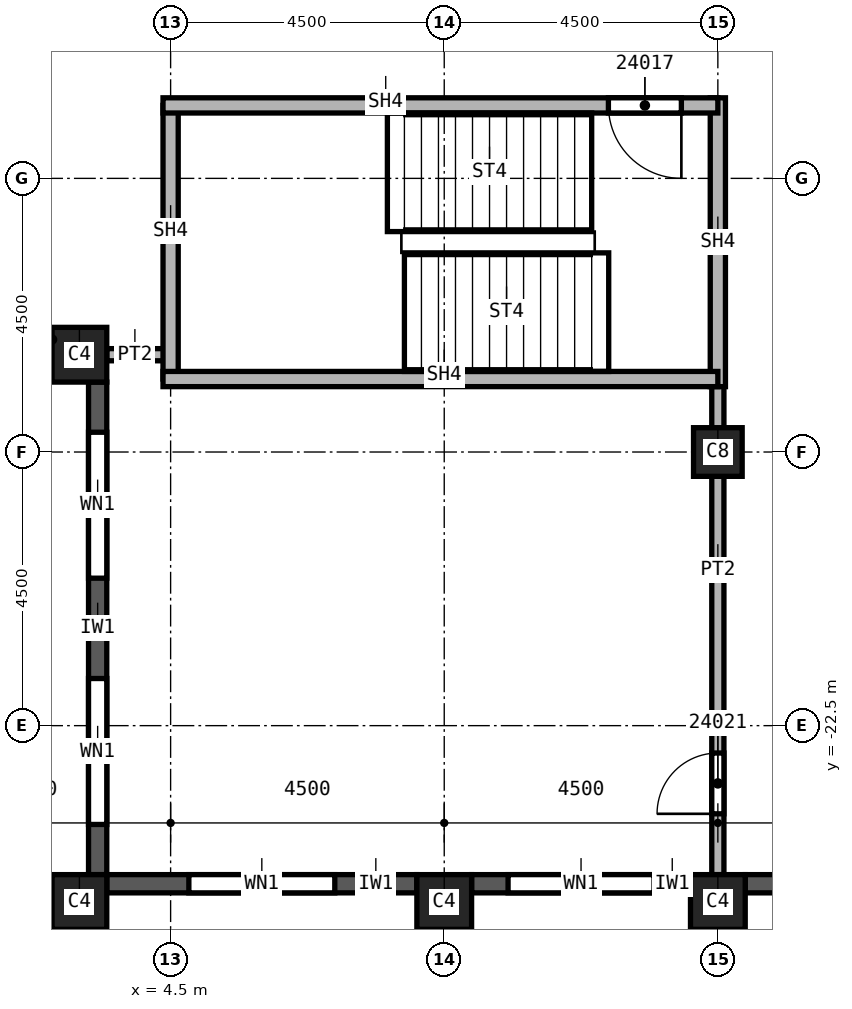
"""IFC4 building model, lengths in metres.
Left out: names, types, materials, properties, quantities, classifications, styles, units other than length and angle.
Written with IfcOpenShell. Run it as: python <this file> out.ifc"""

import sys

from ifc_helpers import new_model, si_unit, direction, frame, frame_2d, origin, origin_2d, place, context, subcontext, project, spatial, rectangle, extrude, element, fill, save


model = new_model("IFC4")
c1 = context("Model", 3, precision=1e-05, world=origin(), true_north=direction((0.0, 1.0)))
c2 = subcontext(c1, "Body", "Model", "MODEL_VIEW")
j1 = project(units=[si_unit("LENGTHUNIT", "METRE"), si_unit("PLANEANGLEUNIT", "RADIAN")], contexts=[c1])
p1 = place(None, origin())
s1 = spatial("IfcSite", under=j1, at=p1, CompositionType="ELEMENT")
p2 = place(p1, origin())
s2 = spatial("IfcBuilding", under=s1, at=p2, CompositionType="ELEMENT")
p3 = place(p2, frame((0.0, 0.0, 342.0)))
s3 = spatial("IfcBuildingStorey", under=s2, at=p3, CompositionType="ELEMENT", Elevation=342.0)
p4 = place(p3, frame((13.5, -18.0, 0.0), z_axis=(0.0, 0.0, 1.0), x_axis=(1.0, 0.0, 0.0)))
e1 = element("IfcColumn", 1, at=p4, inside=s3, PredefinedType="COLUMN", context=c2, shape_type="SweptSolid", body=[
    extrude(rectangle(XDim=0.8, YDim=0.8, at=origin_2d()), origin(), (0.0, 0.0, 1.0), 3.74),
])
for number, where, z_axis, x_axis in (
    (2, (3.0, -25.4, 0.0), (0.0, 0.0, 1.0), (1.0, 0.0, 0.0)),
    (3, (9.0, -25.4, 0.0), (0.0, 0.0, 1.0), (1.0, 0.0, 0.0)),
    (4, (13.5, -25.4, 0.0), (0.0, 0.0, 1.0), (1.0, 0.0, 0.0)),
    (5, (3.0, -16.4, 0.0), (0.0, 0.0, 1.0), (1.0, 0.0, 0.0)),
):
    element("IfcColumn", number, at=place(p3, frame(where, z_axis=z_axis, x_axis=x_axis)), inside=s3, PredefinedType="COLUMN", context=c2, shape_type="SweptSolid", body=[
        extrude(rectangle(XDim=0.9, YDim=0.9, at=origin_2d()), origin(), (0.0, 0.0, 1.0), 3.74),
    ])
p5 = place(p3, frame((3.3, -16.85, 0.0), z_axis=(0.0, 0.0, 1.0), x_axis=(0.0, -1.0, 0.0)))
e6 = element("IfcWall", 6, at=p5, inside=s3, PredefinedType="SOLIDWALL", context=c2, shape_type="SweptSolid", body=[
    extrude(rectangle(XDim=8.1, YDim=0.3, at=frame_2d((4.05, 0.0))), origin(), (0.0, 0.0, 1.0), 3.14),
])
p6 = place(p5, frame((0.825, 0.0, 0.8)))
e7 = element("IfcOpeningElement", 7, at=p6, cuts=e6, PredefinedType="OPENING", context=c2, shape_type="SweptSolid", body=[
    extrude(rectangle(XDim=2.4, YDim=1.95, at=frame_2d((1.2, 0.975))), frame((0.0, 0.15, 0.0), z_axis=(0.0, -1.0, 0.0), x_axis=(1.0, 0.0, 0.0)), (0.0, 0.0, 1.0), 0.3),
])
p7 = place(p5, frame((4.875, 0.0, 0.8)))
e8 = element("IfcOpeningElement", 8, at=p7, cuts=e6, PredefinedType="OPENING", context=c2, shape_type="SweptSolid", body=[
    extrude(rectangle(XDim=2.4, YDim=1.95, at=frame_2d((1.2, 0.975))), frame((0.0, 0.15, 0.0), z_axis=(0.0, -1.0, 0.0), x_axis=(1.0, 0.0, 0.0)), (0.0, 0.0, 1.0), 0.3),
])
p8 = place(p3, frame((3.45, -25.1, 0.0), z_axis=(0.0, 0.0, 1.0), x_axis=(1.0, 0.0, 0.0)))
e9 = element("IfcWall", 9, at=p8, inside=s3, PredefinedType="SOLIDWALL", context=c2, shape_type="SweptSolid", body=[
    extrude(rectangle(XDim=5.1, YDim=0.3, at=frame_2d((2.55, 0.0))), origin(), (0.0, 0.0, 1.0), 3.14),
])
p9 = place(p8, frame((1.35, 0.0, 0.8)))
e10 = element("IfcOpeningElement", 10, at=p9, cuts=e9, PredefinedType="OPENING", context=c2, shape_type="SweptSolid", body=[
    extrude(rectangle(XDim=2.4, YDim=1.95, at=frame_2d((1.2, 0.975))), frame((0.0, 0.15, 0.0), z_axis=(0.0, -1.0, 0.0), x_axis=(1.0, 0.0, 0.0)), (0.0, 0.0, 1.0), 0.3),
])
p10 = place(p3, frame((9.45, -25.1, 0.0), z_axis=(0.0, 0.0, 1.0), x_axis=(1.0, 0.0, 0.0)))
e11 = element("IfcWall", 11, at=p10, inside=s3, PredefinedType="SOLIDWALL", context=c2, shape_type="SweptSolid", body=[
    extrude(rectangle(XDim=3.6, YDim=0.3, at=frame_2d((1.8, 0.0))), origin(), (0.0, 0.0, 1.0), 3.14),
])
p11 = place(p10, frame((0.6, 0.0, 0.8)))
e12 = element("IfcOpeningElement", 12, at=p11, cuts=e11, PredefinedType="OPENING", context=c2, shape_type="SweptSolid", body=[
    extrude(rectangle(XDim=2.4, YDim=1.95, at=frame_2d((1.2, 0.975))), frame((0.0, 0.15, 0.0), z_axis=(0.0, -1.0, 0.0), x_axis=(1.0, 0.0, 0.0)), (0.0, 0.0, 1.0), 0.3),
])
p12 = place(p3, frame((13.95, -25.1, 0.0), z_axis=(0.0, 0.0, 1.0), x_axis=(1.0, 0.0, 0.0)))
e13 = element("IfcWall", 13, at=p12, inside=s3, PredefinedType="SOLIDWALL", context=c2, shape_type="SweptSolid", body=[
    extrude(rectangle(XDim=3.6, YDim=0.3, at=frame_2d((1.8, 0.0))), origin(), (0.0, 0.0, 1.0), 3.14),
])
p13 = place(p12, frame((0.625, 0.0, 0.8)))
e14 = element("IfcOpeningElement", 14, at=p13, cuts=e13, PredefinedType="OPENING", context=c2, shape_type="SweptSolid", body=[
    extrude(rectangle(XDim=0.6, YDim=1.95, at=frame_2d((0.3, 0.975))), frame((0.0, 0.15, 0.0), z_axis=(0.0, -1.0, 0.0), x_axis=(1.0, 0.0, 0.0)), (0.0, 0.0, 1.0), 0.3),
])
p14 = place(p12, frame((1.825, 0.0, 0.8)))
e15 = element("IfcOpeningElement", 15, at=p14, cuts=e13, PredefinedType="OPENING", context=c2, shape_type="SweptSolid", body=[
    extrude(rectangle(XDim=1.0, YDim=1.95, at=frame_2d((0.5, 0.975))), frame((0.0, 0.15, 0.0), z_axis=(0.0, -1.0, 0.0), x_axis=(1.0, 0.0, 0.0)), (0.0, 0.0, 1.0), 0.3),
])
p15 = place(p3, frame((4.5, -16.4, 0.0), z_axis=(0.0, 0.0, 1.0), x_axis=(-1.0, 0.0, 0.0)))
e16 = element("IfcWall", 16, at=p15, inside=s3, PredefinedType="PARTITIONING", context=c2, shape_type="SweptSolid", body=[
    extrude(rectangle(XDim=1.05, YDim=0.2, at=frame_2d((0.525, 0.0))), origin(), (0.0, 0.0, 1.0), 3.74),
])
p16 = place(p3, frame((13.5, -24.95, 0.0), z_axis=(0.0, 0.0, 1.0), x_axis=(0.0, 1.0, 0.0)))
e17 = element("IfcWall", 17, at=p16, inside=s3, PredefinedType="PARTITIONING", context=c2, shape_type="SweptSolid", body=[
    extrude(rectangle(XDim=8.275, YDim=0.2, at=frame_2d((4.137, 0.0))), origin(), (0.0, 0.0, 1.0), 3.74),
])
p17 = place(p16, frame((1.0, 0.0, 0.0)))
e18 = element("IfcOpeningElement", 18, at=p17, cuts=e17, PredefinedType="OPENING", context=c2, shape_type="SweptSolid", body=[
    extrude(rectangle(XDim=1.0, YDim=2.1, at=frame_2d((0.5, 1.05))), frame((0.0, 0.1, 0.0), z_axis=(0.0, -1.0, 0.0), x_axis=(1.0, 0.0, 0.0)), (0.0, 0.0, 1.0), 0.2),
])
p18 = place(p3, frame((4.5, -16.8, 0.0), z_axis=(0.0, 0.0, 1.0), x_axis=(0.0, 1.0, 0.0)))
e19 = element("IfcWall", 19, at=p18, inside=s3, PredefinedType="SOLIDWALL", context=c2, shape_type="SweptSolid", body=[
    extrude(rectangle(XDim=4.5, YDim=0.25, at=frame_2d((2.25, 0.0))), origin(), (0.0, 0.0, 1.0), 3.74),
])
p19 = place(p3, frame((13.5, -16.925, 0.0), z_axis=(0.0, 0.0, 1.0), x_axis=(0.0, 1.0, 0.0)))
e20 = element("IfcWall", 20, at=p19, inside=s3, PredefinedType="SOLIDWALL", context=c2, shape_type="SweptSolid", body=[
    extrude(rectangle(XDim=4.75, YDim=0.25, at=frame_2d((2.375, 0.0))), origin(), (0.0, 0.0, 1.0), 3.74),
])
p20 = place(p3, frame((13.5, -16.8, 0.0), z_axis=(0.0, 0.0, 1.0), x_axis=(-1.0, 0.0, 0.0)))
e21 = element("IfcWall", 21, at=p20, inside=s3, PredefinedType="SOLIDWALL", context=c2, shape_type="SweptSolid", body=[
    extrude(rectangle(XDim=9.125, YDim=0.25, at=frame_2d((4.562, 0.0))), origin(), (0.0, 0.0, 1.0), 3.74),
])
p21 = place(p3, frame((13.5, -12.3, 0.0), z_axis=(0.0, 0.0, 1.0), x_axis=(-1.0, 0.0, 0.0)))
e22 = element("IfcWall", 22, at=p21, inside=s3, PredefinedType="SOLIDWALL", context=c2, shape_type="SweptSolid", body=[
    extrude(rectangle(XDim=9.125, YDim=0.25, at=frame_2d((4.562, 0.0))), origin(), (0.0, 0.0, 1.0), 3.74),
])
p22 = place(p21, frame((0.6, 0.0, 0.0)))
e23 = element("IfcOpeningElement", 23, at=p22, cuts=e22, PredefinedType="OPENING", context=c2, shape_type="SweptSolid", body=[
    extrude(rectangle(XDim=1.2, YDim=2.1, at=frame_2d((0.6, 1.05))), frame((0.0, 0.125, 0.0), z_axis=(0.0, -1.0, 0.0), x_axis=(1.0, 0.0, 0.0)), (0.0, 0.0, 1.0), 0.25),
])
p23 = place(p6, origin())
e24 = element("IfcWindow", 24, at=p23, inside=s3, PartitioningType="SINGLE_PANEL", PredefinedType="WINDOW", context=c2, shape_type="SweptSolid", body=[
    extrude(rectangle(XDim=2.4, YDim=1.95, at=frame_2d((1.2, 0.975))), frame((0.0, 0.03, 0.0), z_axis=(0.0, -1.0, 0.0), x_axis=(1.0, 0.0, 0.0)), (0.0, 0.0, 1.0), 0.06),
])
fill(e7, e24)
p24 = place(p7, origin())
e25 = element("IfcWindow", 25, at=p24, inside=s3, PartitioningType="SINGLE_PANEL", PredefinedType="WINDOW", context=c2, shape_type="SweptSolid", body=[
    extrude(rectangle(XDim=2.4, YDim=1.95, at=frame_2d((1.2, 0.975))), frame((0.0, 0.03, 0.0), z_axis=(0.0, -1.0, 0.0), x_axis=(1.0, 0.0, 0.0)), (0.0, 0.0, 1.0), 0.06),
])
fill(e8, e25)
p25 = place(p9, origin())
e26 = element("IfcWindow", 26, at=p25, inside=s3, PartitioningType="SINGLE_PANEL", PredefinedType="WINDOW", context=c2, shape_type="SweptSolid", body=[
    extrude(rectangle(XDim=2.4, YDim=1.95, at=frame_2d((1.2, 0.975))), frame((0.0, 0.03, 0.0), z_axis=(0.0, -1.0, 0.0), x_axis=(1.0, 0.0, 0.0)), (0.0, 0.0, 1.0), 0.06),
])
fill(e10, e26)
p26 = place(p11, origin())
e27 = element("IfcWindow", 27, at=p26, inside=s3, PartitioningType="SINGLE_PANEL", PredefinedType="WINDOW", context=c2, shape_type="SweptSolid", body=[
    extrude(rectangle(XDim=2.4, YDim=1.95, at=frame_2d((1.2, 0.975))), frame((0.0, 0.03, 0.0), z_axis=(0.0, -1.0, 0.0), x_axis=(1.0, 0.0, 0.0)), (0.0, 0.0, 1.0), 0.06),
])
fill(e12, e27)
p27 = place(p22, origin())
e28 = element("IfcDoor", 28, at=p27, inside=s3, OperationType="SINGLE_SWING_RIGHT", PredefinedType="DOOR", context=c2, shape_type="SweptSolid", body=[
    extrude(rectangle(XDim=1.2, YDim=2.1, at=frame_2d((0.6, 1.05))), frame((0.0, 0.025, 0.0), z_axis=(0.0, -1.0, 0.0), x_axis=(1.0, 0.0, 0.0)), (0.0, 0.0, 1.0), 0.05),
])
fill(e23, e28)
p28 = place(p17, origin())
e29 = element("IfcDoor", 29, at=p28, inside=s3, OperationType="SINGLE_SWING_RIGHT", PredefinedType="DOOR", context=c2, shape_type="SweptSolid", body=[
    extrude(rectangle(XDim=1.0, YDim=2.1, at=frame_2d((0.5, 1.05))), frame((0.0, 0.025, 0.0), z_axis=(0.0, -1.0, 0.0), x_axis=(1.0, 0.0, 0.0)), (0.0, 0.0, 1.0), 0.05),
])
fill(e18, e29)
save(model, sys.argv[1])
